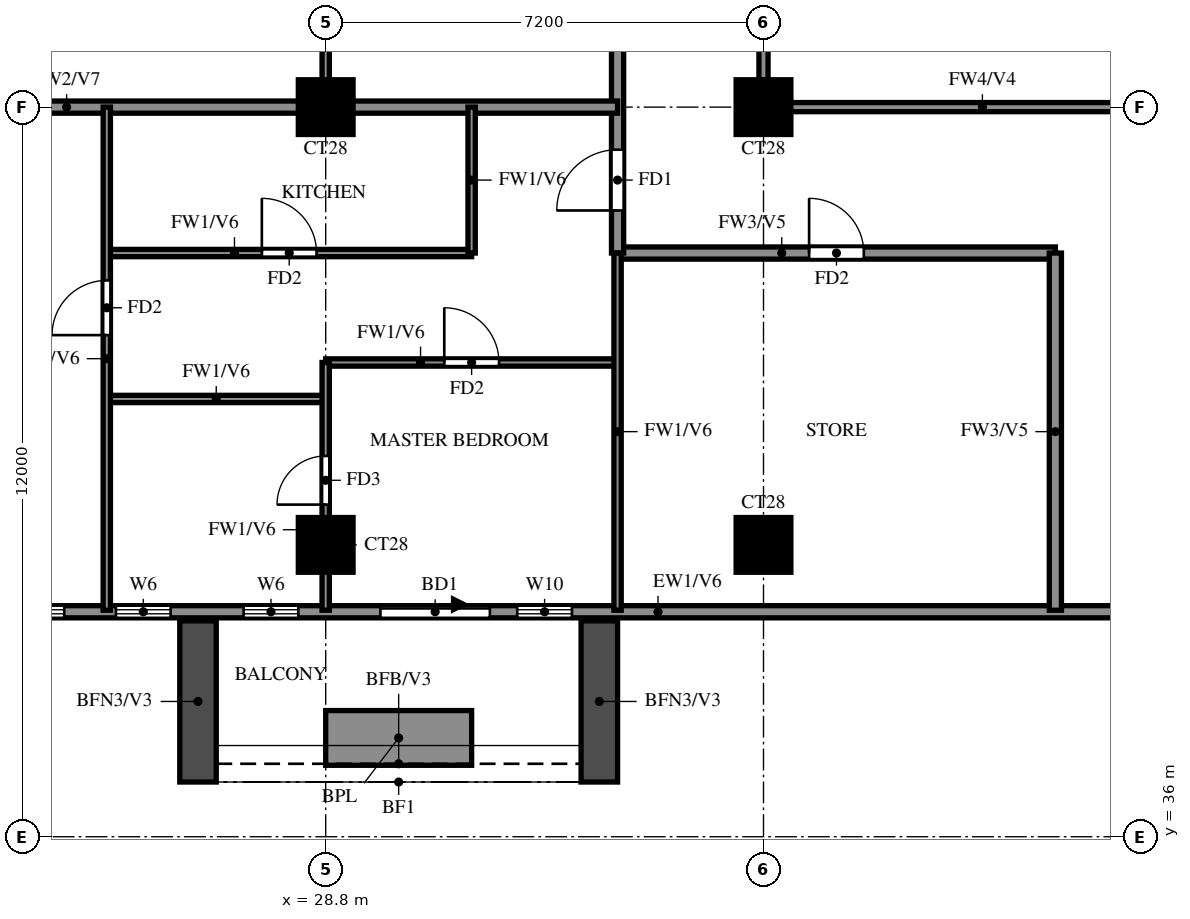
"""IFC4 building model, lengths in metres.
Left out: names, types, materials, properties, quantities, classifications, styles, units other than length and angle.
Written with IfcOpenShell. Run it as: python <this file> out.ifc"""

import sys

from ifc_helpers import new_model, si_unit, direction, frame, frame_2d, origin, origin_2d, place, context, subcontext, project, spatial, rectangle, extrude, source, transform, mapped, element, fill, save


model = new_model("IFC4")
c1 = context("Model", 3, precision=1e-05, world=origin(), true_north=direction((0.0, 1.0)))
c2 = subcontext(c1, "Body", "Model", "MODEL_VIEW")
j1 = project(units=[si_unit("LENGTHUNIT", "METRE"), si_unit("PLANEANGLEUNIT", "RADIAN")], contexts=[c1])
p1 = place(None, origin())
s1 = spatial("IfcSite", under=j1, at=p1, CompositionType="ELEMENT")
p2 = place(p1, origin())
s2 = spatial("IfcBuilding", under=s1, at=p2, CompositionType="ELEMENT")
p3 = place(p2, frame((0.0, 0.0, 202.5)))
s3 = spatial("IfcBuildingStorey", under=s2, at=p3, CompositionType="ELEMENT", Elevation=202.5)
m1 = source(origin(), c2, "Body", "SweptSolid", [
    extrude(rectangle(XDim=0.9, YDim=0.9, at=origin_2d()), origin(), (0.0, 0.0, 1.0), 3.1),
])
for number, where, z_axis, x_axis in (
    (1, (28.8, 40.8, 0.0), (0.0, 0.0, 1.0), (1.0, 0.0, 0.0)),
    (2, (36.0, 40.8, 0.0), (0.0, 0.0, 1.0), (1.0, 0.0, 0.0)),
    (3, (28.8, 48.0, 0.0), (0.0, 0.0, 1.0), (1.0, 0.0, 0.0)),
    (4, (36.0, 48.0, 0.0), (0.0, 0.0, 1.0), (1.0, 0.0, 0.0)),
):
    element("IfcColumn", number, at=place(p3, frame(where, z_axis=z_axis, x_axis=x_axis)), inside=s3, PredefinedType="COLUMN", context=c2, shape_type="MappedRepresentation", body=[
        mapped(m1, transform((0.0, 0.0, 0.0))),
    ])
p4 = place(p3, frame((18.2, 39.7, 0.0), z_axis=(0.0, 0.0, 1.0), x_axis=(1.0, 0.0, 0.0)))
e5 = element("IfcWall", 5, at=p4, inside=s3, PredefinedType="SOLIDWALL", context=c2, shape_type="SweptSolid", body=[
    extrude(rectangle(XDim=23.8, YDim=0.2, at=frame_2d((11.9, 0.0))), origin(), (0.0, 0.0, 1.0), 3.1),
])
p5 = place(p4, frame((11.5, 0.0, 0.0)))
e6 = element("IfcOpeningElement", 6, at=p5, cuts=e5, PredefinedType="OPENING", context=c2, shape_type="SweptSolid", body=[
    extrude(rectangle(XDim=1.8, YDim=2.4, at=frame_2d((0.9, 1.2))), frame((0.0, 0.11, 0.0), z_axis=(0.0, -1.0, 0.0), x_axis=(1.0, 0.0, 0.0)), (0.0, 0.0, 1.0), 0.22),
])
p6 = place(p4, frame((0.9, 0.0, 0.6)))
e7 = element("IfcOpeningElement", 7, at=p6, cuts=e5, PredefinedType="OPENING", context=c2, shape_type="SweptSolid", body=[
    extrude(rectangle(XDim=2.4, YDim=2.4, at=frame_2d((1.2, 1.2))), frame((0.0, 0.11, 0.0), z_axis=(0.0, -1.0, 0.0), x_axis=(1.0, 0.0, 0.0)), (0.0, 0.0, 1.0), 0.22),
])
p7 = place(p4, frame((3.9, 0.0, 0.6)))
e8 = element("IfcOpeningElement", 8, at=p7, cuts=e5, PredefinedType="OPENING", context=c2, shape_type="SweptSolid", body=[
    extrude(rectangle(XDim=2.4, YDim=2.4, at=frame_2d((1.2, 1.2))), frame((0.0, 0.11, 0.0), z_axis=(0.0, -1.0, 0.0), x_axis=(1.0, 0.0, 0.0)), (0.0, 0.0, 1.0), 0.22),
])
p8 = place(p4, frame((13.75, 0.0, 0.6)))
e9 = element("IfcOpeningElement", 9, at=p8, cuts=e5, PredefinedType="OPENING", context=c2, shape_type="SweptSolid", body=[
    extrude(rectangle(XDim=0.9, YDim=2.4, at=frame_2d((0.45, 1.2))), frame((0.0, 0.11, 0.0), z_axis=(0.0, -1.0, 0.0), x_axis=(1.0, 0.0, 0.0)), (0.0, 0.0, 1.0), 0.22),
])
p9 = place(p4, frame((7.15, 0.0, 1.5)))
e10 = element("IfcOpeningElement", 10, at=p9, cuts=e5, PredefinedType="OPENING", context=c2, shape_type="SweptSolid", body=[
    extrude(rectangle(XDim=0.9, YDim=0.9, at=frame_2d((0.45, 0.45))), frame((0.0, 0.11, 0.0), z_axis=(0.0, -1.0, 0.0), x_axis=(1.0, 0.0, 0.0)), (0.0, 0.0, 1.0), 0.22),
])
p10 = place(p4, frame((9.25, 0.0, 1.5)))
e11 = element("IfcOpeningElement", 11, at=p10, cuts=e5, PredefinedType="OPENING", context=c2, shape_type="SweptSolid", body=[
    extrude(rectangle(XDim=0.9, YDim=0.9, at=frame_2d((0.45, 0.45))), frame((0.0, 0.11, 0.0), z_axis=(0.0, -1.0, 0.0), x_axis=(1.0, 0.0, 0.0)), (0.0, 0.0, 1.0), 0.22),
])
for number, where, z_axis, x_axis in (
    (12, (26.7, 39.55, 0.0), (0.0, 0.0, 1.0), (0.0, -1.0, 0.0)),
    (13, (33.3, 39.55, 0.0), (0.0, 0.0, 1.0), (0.0, -1.0, 0.0)),
):
    element("IfcWall", number, at=place(p3, frame(where, z_axis=z_axis, x_axis=x_axis)), inside=s3, PredefinedType="SOLIDWALL", context=c2, shape_type="SweptSolid", body=[
        extrude(rectangle(XDim=2.65, YDim=0.6, at=frame_2d((1.325, 0.0))), origin(), (0.0, 0.0, 1.0), 2.75),
    ])
p11 = place(p3, frame((28.8, 37.625, 0.0), z_axis=(0.0, 0.0, 1.0), x_axis=(1.0, 0.0, 0.0)))
e14 = element("IfcWall", 14, at=p11, inside=s3, PredefinedType="SOLIDWALL", context=c2, shape_type="SweptSolid", body=[
    extrude(rectangle(XDim=2.4, YDim=0.9, at=frame_2d((1.2, 0.0))), origin(), (0.0, 0.0, 1.0), 0.9),
])
p12 = place(p3, frame((33.6, 45.6, 0.0), z_axis=(0.0, 0.0, 1.0), x_axis=(1.0, 0.0, 0.0)))
e15 = element("IfcWall", 15, at=p12, inside=s3, PredefinedType="SOLIDWALL", context=c2, shape_type="SweptSolid", body=[
    extrude(rectangle(XDim=7.2, YDim=0.2, at=frame_2d((3.6, 0.0))), origin(), (0.0, 0.0, 1.0), 3.1),
])
p13 = place(p12, frame((3.15, 0.0, 0.0)))
e16 = element("IfcOpeningElement", 16, at=p13, cuts=e15, PredefinedType="OPENING", context=c2, shape_type="SweptSolid", body=[
    extrude(rectangle(XDim=0.9, YDim=2.1, at=frame_2d((0.45, 1.05))), frame((0.0, 0.11, 0.0), z_axis=(0.0, -1.0, 0.0), x_axis=(1.0, 0.0, 0.0)), (0.0, 0.0, 1.0), 0.22),
])
p14 = place(p3, frame((33.6, 45.6, 0.0), z_axis=(0.0, 0.0, 1.0), x_axis=(0.0, 1.0, 0.0)))
e17 = element("IfcWall", 17, at=p14, inside=s3, PredefinedType="SOLIDWALL", context=c2, shape_type="SweptSolid", body=[
    extrude(rectangle(XDim=16.8, YDim=0.2, at=frame_2d((8.4, 0.0))), origin(), (0.0, 0.0, 1.0), 3.1),
])
p15 = place(p14, frame((0.7, 0.0, 0.0)))
e18 = element("IfcOpeningElement", 18, at=p15, cuts=e17, PredefinedType="OPENING", context=c2, shape_type="SweptSolid", body=[
    extrude(rectangle(XDim=1.0, YDim=2.1, at=frame_2d((0.5, 1.05))), frame((0.0, 0.11, 0.0), z_axis=(0.0, -1.0, 0.0), x_axis=(1.0, 0.0, 0.0)), (0.0, 0.0, 1.0), 0.22),
])
p16 = place(p14, frame((8.3, 0.0, 0.0)))
e19 = element("IfcOpeningElement", 19, at=p16, cuts=e17, PredefinedType="OPENING", context=c2, shape_type="SweptSolid", body=[
    extrude(rectangle(XDim=1.0, YDim=2.1, at=frame_2d((0.5, 1.05))), frame((0.0, 0.11, 0.0), z_axis=(0.0, -1.0, 0.0), x_axis=(1.0, 0.0, 0.0)), (0.0, 0.0, 1.0), 0.22),
])
p17 = place(p14, frame((15.1, 0.0, 0.0)))
e20 = element("IfcOpeningElement", 20, at=p17, cuts=e17, PredefinedType="OPENING", context=c2, shape_type="SweptSolid", body=[
    extrude(rectangle(XDim=1.0, YDim=2.1, at=frame_2d((0.5, 1.05))), frame((0.0, 0.11, 0.0), z_axis=(0.0, -1.0, 0.0), x_axis=(1.0, 0.0, 0.0)), (0.0, 0.0, 1.0), 0.22),
])
p18 = place(p3, frame((40.8, 39.725, 0.0), z_axis=(0.0, 0.0, 1.0), x_axis=(0.0, 1.0, 0.0)))
e21 = element("IfcWall", 21, at=p18, inside=s3, PredefinedType="SOLIDWALL", context=c2, shape_type="SweptSolid", body=[
    extrude(rectangle(XDim=5.875, YDim=0.2, at=frame_2d((2.938, 0.0))), origin(), (0.0, 0.0, 1.0), 3.1),
])
p19 = place(p3, frame((14.525, 48.0, 0.0), z_axis=(0.0, 0.0, 1.0), x_axis=(1.0, 0.0, 0.0)))
e22 = element("IfcWall", 22, at=p19, inside=s3, PredefinedType="SOLIDWALL", context=c2, shape_type="SweptSolid", body=[
    extrude(rectangle(XDim=19.075, YDim=0.2, at=frame_2d((9.538, 0.0))), origin(), (0.0, 0.0, 1.0), 3.1),
])
p20 = place(p3, frame((25.2, 43.2, 0.0), z_axis=(0.0, 0.0, 1.0), x_axis=(1.0, 0.0, 0.0)))
e23 = element("IfcWall", 23, at=p20, inside=s3, PredefinedType="PARTITIONING", context=c2, shape_type="SweptSolid", body=[
    extrude(rectangle(XDim=3.6, YDim=0.12, at=frame_2d((1.8, 0.0))), origin(), (0.0, 0.0, 1.0), 3.1),
])
p21 = place(p3, frame((28.8, 43.8, 0.0), z_axis=(0.0, 0.0, 1.0), x_axis=(1.0, 0.0, 0.0)))
e24 = element("IfcWall", 24, at=p21, inside=s3, PredefinedType="PARTITIONING", context=c2, shape_type="SweptSolid", body=[
    extrude(rectangle(XDim=4.8, YDim=0.12, at=frame_2d((2.4, 0.0))), origin(), (0.0, 0.0, 1.0), 3.1),
])
p22 = place(p21, frame((1.95, 0.0, 0.0)))
e25 = element("IfcOpeningElement", 25, at=p22, cuts=e24, PredefinedType="OPENING", context=c2, shape_type="SweptSolid", body=[
    extrude(rectangle(XDim=0.9, YDim=2.1, at=frame_2d((0.45, 1.05))), frame((0.0, 0.07, 0.0), z_axis=(0.0, -1.0, 0.0), x_axis=(1.0, 0.0, 0.0)), (0.0, 0.0, 1.0), 0.14),
])
p23 = place(p3, frame((25.2, 45.6, 0.0), z_axis=(0.0, 0.0, 1.0), x_axis=(1.0, 0.0, 0.0)))
e26 = element("IfcWall", 26, at=p23, inside=s3, PredefinedType="PARTITIONING", context=c2, shape_type="SweptSolid", body=[
    extrude(rectangle(XDim=6.0, YDim=0.12, at=frame_2d((3.0, 0.0))), origin(), (0.0, 0.0, 1.0), 3.1),
])
p24 = place(p23, frame((2.55, 0.0, 0.0)))
e27 = element("IfcOpeningElement", 27, at=p24, cuts=e26, PredefinedType="OPENING", context=c2, shape_type="SweptSolid", body=[
    extrude(rectangle(XDim=0.9, YDim=2.1, at=frame_2d((0.45, 1.05))), frame((0.0, 0.07, 0.0), z_axis=(0.0, -1.0, 0.0), x_axis=(1.0, 0.0, 0.0)), (0.0, 0.0, 1.0), 0.14),
])
p25 = place(p3, frame((25.2, 39.725, 0.0), z_axis=(0.0, 0.0, 1.0), x_axis=(0.0, 1.0, 0.0)))
e28 = element("IfcWall", 28, at=p25, inside=s3, PredefinedType="PARTITIONING", context=c2, shape_type="SweptSolid", body=[
    extrude(rectangle(XDim=8.275, YDim=0.12, at=frame_2d((4.137, 0.0))), origin(), (0.0, 0.0, 1.0), 3.1),
])
p26 = place(p25, frame((4.525, 0.0, 0.0)))
e29 = element("IfcOpeningElement", 29, at=p26, cuts=e28, PredefinedType="OPENING", context=c2, shape_type="SweptSolid", body=[
    extrude(rectangle(XDim=0.9, YDim=2.1, at=frame_2d((0.45, 1.05))), frame((0.0, 0.07, 0.0), z_axis=(0.0, -1.0, 0.0), x_axis=(1.0, 0.0, 0.0)), (0.0, 0.0, 1.0), 0.14),
])
p27 = place(p3, frame((28.8, 39.725, 0.0), z_axis=(0.0, 0.0, 1.0), x_axis=(0.0, 1.0, 0.0)))
e30 = element("IfcWall", 30, at=p27, inside=s3, PredefinedType="PARTITIONING", context=c2, shape_type="SweptSolid", body=[
    extrude(rectangle(XDim=4.075, YDim=0.12, at=frame_2d((2.038, 0.0))), origin(), (0.0, 0.0, 1.0), 3.1),
])
p28 = place(p27, frame((1.738, 0.0, 0.0)))
e31 = element("IfcOpeningElement", 31, at=p28, cuts=e30, PredefinedType="OPENING", context=c2, shape_type="SweptSolid", body=[
    extrude(rectangle(XDim=0.8, YDim=2.1, at=frame_2d((0.4, 1.05))), frame((0.0, 0.07, 0.0), z_axis=(0.0, -1.0, 0.0), x_axis=(1.0, 0.0, 0.0)), (0.0, 0.0, 1.0), 0.14),
])
p29 = place(p3, frame((28.8, 48.0, 0.0), z_axis=(0.0, 0.0, 1.0), x_axis=(0.0, 1.0, 0.0)))
e32 = element("IfcWall", 32, at=p29, inside=s3, PredefinedType="PARTITIONING", context=c2, shape_type="SweptSolid", body=[
    extrude(rectangle(XDim=5.2, YDim=0.12, at=frame_2d((2.6, 0.0))), origin(), (0.0, 0.0, 1.0), 3.1),
])
p30 = place(p3, frame((31.2, 45.6, 0.0), z_axis=(0.0, 0.0, 1.0), x_axis=(0.0, 1.0, 0.0)))
e33 = element("IfcWall", 33, at=p30, inside=s3, PredefinedType="PARTITIONING", context=c2, shape_type="SweptSolid", body=[
    extrude(rectangle(XDim=2.4, YDim=0.12, at=frame_2d((1.2, 0.0))), origin(), (0.0, 0.0, 1.0), 3.1),
])
p31 = place(p3, frame((33.6, 39.725, 0.0), z_axis=(0.0, 0.0, 1.0), x_axis=(0.0, 1.0, 0.0)))
e34 = element("IfcWall", 34, at=p31, inside=s3, PredefinedType="PARTITIONING", context=c2, shape_type="SweptSolid", body=[
    extrude(rectangle(XDim=5.875, YDim=0.12, at=frame_2d((2.938, 0.0))), origin(), (0.0, 0.0, 1.0), 3.1),
])
p32 = place(p3, frame((36.0, 48.0, 0.0), z_axis=(0.0, 0.0, 1.0), x_axis=(1.0, 0.0, 0.0)))
e35 = element("IfcWall", 35, at=p32, inside=s3, PredefinedType="SOLIDWALL", context=c2, shape_type="SweptSolid", body=[
    extrude(rectangle(XDim=7.2, YDim=0.15, at=frame_2d((3.6, 0.0))), origin(), (0.0, 0.0, 1.0), 2.2),
])
p33 = place(p3, frame((36.0, 48.0, 0.0), z_axis=(0.0, 0.0, 1.0), x_axis=(0.0, 1.0, 0.0)))
e36 = element("IfcWall", 36, at=p33, inside=s3, PredefinedType="SOLIDWALL", context=c2, shape_type="SweptSolid", body=[
    extrude(rectangle(XDim=14.4, YDim=0.15, at=frame_2d((7.2, 0.0))), origin(), (0.0, 0.0, 1.0), 2.2),
])
p34 = place(p5, origin())
e37 = element("IfcDoor", 37, at=p34, inside=s3, OperationType="DOUBLE_DOOR_SLIDING", PredefinedType="DOOR", context=c2, shape_type="SweptSolid", body=[
    extrude(rectangle(XDim=1.8, YDim=2.4, at=frame_2d((0.9, 1.2))), frame((0.0, 0.025, 0.0), z_axis=(0.0, -1.0, 0.0), x_axis=(1.0, 0.0, 0.0)), (0.0, 0.0, 1.0), 0.05),
])
fill(e6, e37)
p35 = place(p7, origin())
e38 = element("IfcWindow", 38, at=p35, inside=s3, PartitioningType="DOUBLE_PANEL_VERTICAL", PredefinedType="WINDOW", context=c2, shape_type="SweptSolid", body=[
    extrude(rectangle(XDim=2.4, YDim=2.4, at=frame_2d((1.2, 1.2))), frame((0.0, 0.03, 0.0), z_axis=(0.0, -1.0, 0.0), x_axis=(1.0, 0.0, 0.0)), (0.0, 0.0, 1.0), 0.06),
])
fill(e8, e38)
p36 = place(p8, origin())
e39 = element("IfcWindow", 39, at=p36, inside=s3, PartitioningType="SINGLE_PANEL", PredefinedType="WINDOW", context=c2, shape_type="SweptSolid", body=[
    extrude(rectangle(XDim=0.9, YDim=2.4, at=frame_2d((0.45, 1.2))), frame((0.0, 0.03, 0.0), z_axis=(0.0, -1.0, 0.0), x_axis=(1.0, 0.0, 0.0)), (0.0, 0.0, 1.0), 0.06),
])
fill(e9, e39)
p37 = place(p9, origin())
e40 = element("IfcWindow", 40, at=p37, inside=s3, PartitioningType="SINGLE_PANEL", PredefinedType="WINDOW", context=c2, shape_type="SweptSolid", body=[
    extrude(rectangle(XDim=0.9, YDim=0.9, at=frame_2d((0.45, 0.45))), frame((0.0, 0.03, 0.0), z_axis=(0.0, -1.0, 0.0), x_axis=(1.0, 0.0, 0.0)), (0.0, 0.0, 1.0), 0.06),
])
fill(e10, e40)
p38 = place(p10, origin())
e41 = element("IfcWindow", 41, at=p38, inside=s3, PartitioningType="SINGLE_PANEL", PredefinedType="WINDOW", context=c2, shape_type="SweptSolid", body=[
    extrude(rectangle(XDim=0.9, YDim=0.9, at=frame_2d((0.45, 0.45))), frame((0.0, 0.03, 0.0), z_axis=(0.0, -1.0, 0.0), x_axis=(1.0, 0.0, 0.0)), (0.0, 0.0, 1.0), 0.06),
])
fill(e11, e41)
p39 = place(p15, origin())
e42 = element("IfcDoor", 42, at=p39, inside=s3, OperationType="SINGLE_SWING_RIGHT", PredefinedType="DOOR", context=c2, shape_type="SweptSolid", body=[
    extrude(rectangle(XDim=1.0, YDim=2.1, at=frame_2d((0.5, 1.05))), frame((0.0, 0.025, 0.0), z_axis=(0.0, -1.0, 0.0), x_axis=(1.0, 0.0, 0.0)), (0.0, 0.0, 1.0), 0.05),
])
fill(e18, e42)
p40 = place(p26, origin())
e43 = element("IfcDoor", 43, at=p40, inside=s3, OperationType="SINGLE_SWING_LEFT", PredefinedType="DOOR", context=c2, shape_type="SweptSolid", body=[
    extrude(rectangle(XDim=0.9, YDim=2.1, at=frame_2d((0.45, 1.05))), frame((0.0, 0.025, 0.0), z_axis=(0.0, -1.0, 0.0), x_axis=(1.0, 0.0, 0.0)), (0.0, 0.0, 1.0), 0.05),
])
fill(e29, e43)
p41 = place(p22, origin())
e44 = element("IfcDoor", 44, at=p41, inside=s3, OperationType="SINGLE_SWING_LEFT", PredefinedType="DOOR", context=c2, shape_type="SweptSolid", body=[
    extrude(rectangle(XDim=0.9, YDim=2.1, at=frame_2d((0.45, 1.05))), frame((0.0, 0.025, 0.0), z_axis=(0.0, -1.0, 0.0), x_axis=(1.0, 0.0, 0.0)), (0.0, 0.0, 1.0), 0.05),
])
fill(e25, e44)
p42 = place(p28, origin())
e45 = element("IfcDoor", 45, at=p42, inside=s3, OperationType="SINGLE_SWING_LEFT", PredefinedType="DOOR", context=c2, shape_type="SweptSolid", body=[
    extrude(rectangle(XDim=0.8, YDim=2.1, at=frame_2d((0.4, 1.05))), frame((0.0, 0.025, 0.0), z_axis=(0.0, -1.0, 0.0), x_axis=(1.0, 0.0, 0.0)), (0.0, 0.0, 1.0), 0.05),
])
fill(e31, e45)
p43 = place(p24, origin())
e46 = element("IfcDoor", 46, at=p43, inside=s3, OperationType="SINGLE_SWING_LEFT", PredefinedType="DOOR", context=c2, shape_type="SweptSolid", body=[
    extrude(rectangle(XDim=0.9, YDim=2.1, at=frame_2d((0.45, 1.05))), frame((0.0, 0.025, 0.0), z_axis=(0.0, -1.0, 0.0), x_axis=(1.0, 0.0, 0.0)), (0.0, 0.0, 1.0), 0.05),
])
fill(e27, e46)
p44 = place(p13, origin())
e47 = element("IfcDoor", 47, at=p44, inside=s3, OperationType="SINGLE_SWING_LEFT", PredefinedType="DOOR", context=c2, shape_type="SweptSolid", body=[
    extrude(rectangle(XDim=0.9, YDim=2.1, at=frame_2d((0.45, 1.05))), frame((0.0, 0.025, 0.0), z_axis=(0.0, -1.0, 0.0), x_axis=(1.0, 0.0, 0.0)), (0.0, 0.0, 1.0), 0.05),
])
fill(e16, e47)
save(model, sys.argv[1])
